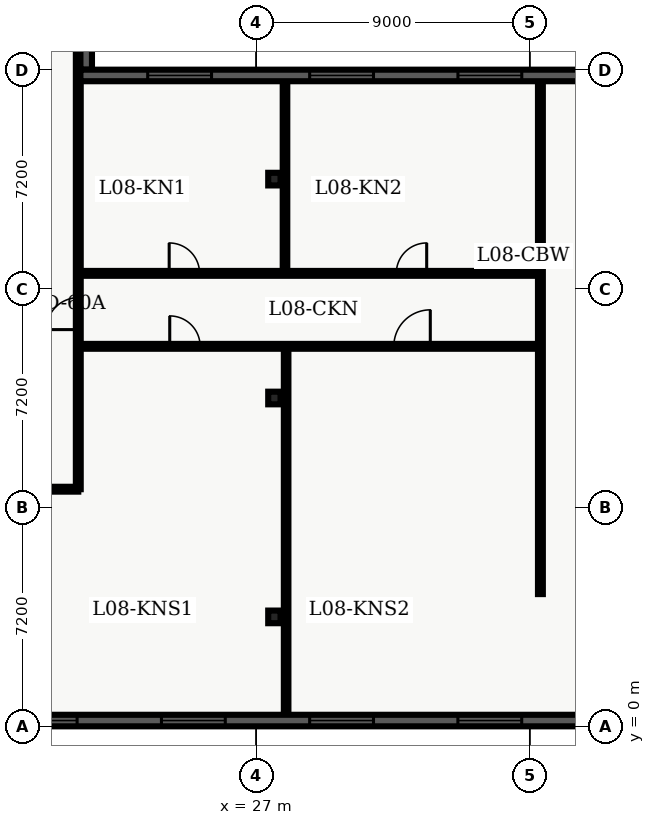
"""IFC4 building model, lengths in metres.
Left out: names, types, materials, properties, quantities, classifications, styles, units other than length and angle.
Written with IfcOpenShell. Run it as: python <this file> out.ifc"""

import sys

from ifc_helpers import new_model, entity, si_unit, converted_unit, direction, frame, origin_with_axes, origin_2d_with_axis, place, context, subcontext, project, spatial, polyline, rectangle, i_section, outline, extrude, element, fill, save


model = new_model("IFC4")
c1 = context("Model", 3, precision=1e-05, world=origin_with_axes(), true_north=direction((0.0, 1.0)))
c2 = subcontext(c1, "Body", "Model", "MODEL_VIEW")
j1 = project(units=[si_unit("LENGTHUNIT", "METRE"), converted_unit("PLANEANGLEUNIT", "DEGREE", entity("IfcPlaneAngleMeasure", 0.017), si_unit("PLANEANGLEUNIT", "RADIAN"), dimensions=[0, 0, 0, 0, 0, 0, 0])], contexts=[c1])
p1 = place(None, origin_with_axes())
s1 = spatial("IfcSite", under=j1, at=p1, CompositionType="ELEMENT")
p2 = place(p1, origin_with_axes())
s2 = spatial("IfcBuilding", under=s1, at=p2, CompositionType="ELEMENT")
p3 = place(p2, frame((0.0, 0.0, 36.6), z_axis=(0.0, 0.0, 1.0), x_axis=(1.0, 0.0, 0.0)))
s3 = spatial("IfcBuildingStorey", under=s2, at=p3, CompositionType="ELEMENT", Elevation=36.6)
for number, where, z_axis, x_axis in (
    (1, (27.6, 3.6, 0.0), (0.0, 0.0, 1.0), (1.0, 0.0, 0.0)),
    (2, (27.6, 10.8, 0.0), (0.0, 0.0, 1.0), (1.0, 0.0, 0.0)),
    (3, (27.6, 18.0, 0.0), (0.0, 0.0, 1.0), (1.0, 0.0, 0.0)),
):
    element("IfcColumn", number, at=place(p3, frame(where, z_axis=z_axis, x_axis=x_axis)), inside=s3, PredefinedType="COLUMN", context=c2, shape_type="SweptSolid", body=[
        extrude(i_section(OverallWidth=0.406, OverallDepth=0.416, WebThickness=0.03, FlangeThickness=0.048, FilletRadius=0.022, at=origin_2d_with_axis()), origin_with_axes(), (0.0, 0.0, 1.0), 3.9),
    ])
p4 = place(p3, frame((2.6, 7.8, 0.0), z_axis=(0.0, 0.0, 1.0), x_axis=(1.0, 0.0, 0.0)))
e4 = element("IfcWall", 4, at=p4, inside=s3, PredefinedType="PARTITIONING", context=c2, shape_type="SweptSolid", body=[
    extrude(outline(polyline([(0.0, -0.08), (18.55, -0.08), (18.55, 0.08), (0.0, 0.08), (0.0, -0.08)])), origin_with_axes(), (0.0, 0.0, 1.0), 2.7),
])
p5 = place(p4, frame((3.765, 0.0, 0.0), z_axis=(0.0, 0.0, 1.0), x_axis=(1.0, 0.0, 0.0)))
e5 = element("IfcOpeningElement", 5, at=p5, cuts=e4, PredefinedType="OPENING", context=c2, shape_type="SweptSolid", body=[
    extrude(rectangle(XDim=1.0, YDim=0.18, at=origin_2d_with_axis()), origin_with_axes(), (0.0, 0.0, 1.0), 2.15),
])
p6 = place(p4, frame((13.3, 0.0, 0.0), z_axis=(0.0, 0.0, 1.0), x_axis=(1.0, 0.0, 0.0)))
e6 = element("IfcOpeningElement", 6, at=p6, cuts=e4, PredefinedType="OPENING", context=c2, shape_type="SweptSolid", body=[
    extrude(rectangle(XDim=1.0, YDim=0.18, at=origin_2d_with_axis()), origin_with_axes(), (0.0, 0.0, 1.0), 2.15),
])
p7 = place(p3, frame((21.15, 7.8, 0.0), z_axis=(0.0, 0.0, 1.0), x_axis=(0.0, 1.0, 0.0)))
e7 = element("IfcWall", 7, at=p7, inside=s3, PredefinedType="PARTITIONING", context=c2, shape_type="SweptSolid", body=[
    extrude(outline(polyline([(0.0, -0.08), (32.7, -0.08), (32.7, 0.08), (0.0, 0.08), (0.0, -0.08)])), origin_with_axes(), (0.0, 0.0, 1.0), 2.7),
])
p8 = place(p7, frame((5.775, 0.0, 0.0), z_axis=(0.0, 0.0, 1.0), x_axis=(1.0, 0.0, 0.0)))
e8 = element("IfcOpeningElement", 8, at=p8, cuts=e7, PredefinedType="OPENING", context=c2, shape_type="SweptSolid", body=[
    extrude(rectangle(XDim=1.05, YDim=0.18, at=origin_2d_with_axis()), origin_with_axes(), (0.0, 0.0, 1.0), 2.15),
])
p9 = place(p3, frame((21.15, 12.5, 0.0), z_axis=(0.0, 0.0, 1.0), x_axis=(1.0, 0.0, 0.0)))
e9 = element("IfcWall", 9, at=p9, inside=s3, PredefinedType="PARTITIONING", context=c2, shape_type="SweptSolid", body=[
    extrude(outline(polyline([(0.0, -0.08), (15.2, -0.08), (15.2, 0.08), (0.0, 0.08), (0.0, -0.08)])), origin_with_axes(), (0.0, 0.0, 1.0), 2.7),
])
p10 = place(p9, frame((3.508, 0.0, 0.0), z_axis=(0.0, 0.0, 1.0), x_axis=(1.0, 0.0, 0.0)))
e10 = element("IfcOpeningElement", 10, at=p10, cuts=e9, PredefinedType="OPENING", context=c2, shape_type="SweptSolid", body=[
    extrude(rectangle(XDim=1.0, YDim=0.18, at=origin_2d_with_axis()), origin_with_axes(), (0.0, 0.0, 1.0), 2.15),
])
p11 = place(p9, frame((10.978, 0.0, 0.0), z_axis=(0.0, 0.0, 1.0), x_axis=(1.0, 0.0, 0.0)))
e11 = element("IfcOpeningElement", 11, at=p11, cuts=e9, PredefinedType="OPENING", context=c2, shape_type="SweptSolid", body=[
    extrude(rectangle(XDim=1.2, YDim=0.18, at=origin_2d_with_axis()), origin_with_axes(), (0.0, 0.0, 1.0), 2.2),
])
p12 = place(p3, frame((21.15, 14.9, 0.0), z_axis=(0.0, 0.0, 1.0), x_axis=(1.0, 0.0, 0.0)))
e12 = element("IfcWall", 12, at=p12, inside=s3, PredefinedType="PARTITIONING", context=c2, shape_type="SweptSolid", body=[
    extrude(outline(polyline([(0.0, -0.08), (15.2, -0.08), (15.2, 0.08), (0.0, 0.08), (0.0, -0.08)])), origin_with_axes(), (0.0, 0.0, 1.0), 2.7),
])
p13 = place(p12, frame((3.49, 0.0, 0.0), z_axis=(0.0, 0.0, 1.0), x_axis=(1.0, 0.0, 0.0)))
e13 = element("IfcOpeningElement", 13, at=p13, cuts=e12, PredefinedType="OPENING", context=c2, shape_type="SweptSolid", body=[
    extrude(rectangle(XDim=1.0, YDim=0.18, at=origin_2d_with_axis()), origin_with_axes(), (0.0, 0.0, 1.0), 2.15),
])
p14 = place(p12, frame((10.96, 0.0, 0.0), z_axis=(0.0, 0.0, 1.0), x_axis=(1.0, 0.0, 0.0)))
e14 = element("IfcOpeningElement", 14, at=p14, cuts=e12, PredefinedType="OPENING", context=c2, shape_type="SweptSolid", body=[
    extrude(rectangle(XDim=1.0, YDim=0.18, at=origin_2d_with_axis()), origin_with_axes(), (0.0, 0.0, 1.0), 2.15),
])
p15 = place(p3, frame((36.35, 4.35, 0.0), z_axis=(0.0, 0.0, 1.0), x_axis=(0.0, 1.0, 0.0)))
e15 = element("IfcWall", 15, at=p15, inside=s3, PredefinedType="PARTITIONING", context=c2, shape_type="SweptSolid", body=[
    extrude(outline(polyline([(0.0, -0.08), (16.95, -0.08), (16.95, 0.08), (0.0, 0.08), (0.0, -0.08)])), origin_with_axes(), (0.0, 0.0, 1.0), 2.7),
])
p16 = place(p3, frame((27.986, 0.36, 0.0), z_axis=(0.0, 0.0, 1.0), x_axis=(0.0, 1.0, 0.0)))
e16 = element("IfcWall", 16, at=p16, inside=s3, PredefinedType="PARTITIONING", context=c2, shape_type="SweptSolid", body=[
    extrude(outline(polyline([(0.0, -0.075), (12.02, -0.075), (12.02, 0.075), (0.0, 0.075), (0.0, -0.075)])), origin_with_axes(), (0.0, 0.0, 1.0), 2.7),
])
p17 = place(p3, frame((27.949, 15.02, 0.0), z_axis=(0.0, 0.0, 1.0), x_axis=(0.0, 1.0, 0.0)))
e17 = element("IfcWall", 17, at=p17, inside=s3, PredefinedType="PARTITIONING", context=c2, shape_type="SweptSolid", body=[
    extrude(outline(polyline([(0.0, -0.075), (6.205, -0.075), (6.205, 0.075), (0.0, 0.075), (0.0, -0.075)])), origin_with_axes(), (0.0, 0.0, 1.0), 2.7),
])
p18 = place(p3, frame((57.22, 0.19, 0.0), z_axis=(0.0, 0.0, 1.0), x_axis=(-1.0, 0.0, 0.0)))
e18 = element("IfcWall", 18, at=p18, inside=s3, PredefinedType="SOLIDWALL", context=c2, shape_type="SweptSolid", body=[
    extrude(outline(polyline([(0.0, -0.19), (54.82, -0.19), (54.82, 0.19), (0.0, 0.19), (0.0, -0.19)])), origin_with_axes(), (0.0, 0.0, 1.0), 3.66),
])
p19 = place(p18, frame((3.037, 0.0, 0.45), z_axis=(0.0, 0.0, 1.0), x_axis=(1.0, 0.0, 0.0)))
e19 = element("IfcOpeningElement", 19, at=p19, cuts=e18, PredefinedType="OPENING", context=c2, shape_type="SweptSolid", body=[
    extrude(rectangle(XDim=2.1, YDim=0.4, at=origin_2d_with_axis()), origin_with_axes(), (0.0, 0.0, 1.0), 2.2),
])
p20 = place(p18, frame((7.912, 0.0, 0.45), z_axis=(0.0, 0.0, 1.0), x_axis=(1.0, 0.0, 0.0)))
e20 = element("IfcOpeningElement", 20, at=p20, cuts=e18, PredefinedType="OPENING", context=c2, shape_type="SweptSolid", body=[
    extrude(rectangle(XDim=2.1, YDim=0.4, at=origin_2d_with_axis()), origin_with_axes(), (0.0, 0.0, 1.0), 2.2),
])
p21 = place(p18, frame((12.786, 0.0, 0.45), z_axis=(0.0, 0.0, 1.0), x_axis=(1.0, 0.0, 0.0)))
e21 = element("IfcOpeningElement", 21, at=p21, cuts=e18, PredefinedType="OPENING", context=c2, shape_type="SweptSolid", body=[
    extrude(rectangle(XDim=2.1, YDim=0.4, at=origin_2d_with_axis()), origin_with_axes(), (0.0, 0.0, 1.0), 2.2),
])
p22 = place(p18, frame((17.661, 0.0, 0.45), z_axis=(0.0, 0.0, 1.0), x_axis=(1.0, 0.0, 0.0)))
e22 = element("IfcOpeningElement", 22, at=p22, cuts=e18, PredefinedType="OPENING", context=c2, shape_type="SweptSolid", body=[
    extrude(rectangle(XDim=2.1, YDim=0.4, at=origin_2d_with_axis()), origin_with_axes(), (0.0, 0.0, 1.0), 2.2),
])
p23 = place(p18, frame((22.535, 0.0, 0.45), z_axis=(0.0, 0.0, 1.0), x_axis=(1.0, 0.0, 0.0)))
e23 = element("IfcOpeningElement", 23, at=p23, cuts=e18, PredefinedType="OPENING", context=c2, shape_type="SweptSolid", body=[
    extrude(rectangle(XDim=2.1, YDim=0.4, at=origin_2d_with_axis()), origin_with_axes(), (0.0, 0.0, 1.0), 2.2),
])
p24 = place(p18, frame((27.41, 0.0, 0.45), z_axis=(0.0, 0.0, 1.0), x_axis=(1.0, 0.0, 0.0)))
e24 = element("IfcOpeningElement", 24, at=p24, cuts=e18, PredefinedType="OPENING", context=c2, shape_type="SweptSolid", body=[
    extrude(rectangle(XDim=2.1, YDim=0.4, at=origin_2d_with_axis()), origin_with_axes(), (0.0, 0.0, 1.0), 2.2),
])
p25 = place(p18, frame((32.285, 0.0, 0.45), z_axis=(0.0, 0.0, 1.0), x_axis=(1.0, 0.0, 0.0)))
e25 = element("IfcOpeningElement", 25, at=p25, cuts=e18, PredefinedType="OPENING", context=c2, shape_type="SweptSolid", body=[
    extrude(rectangle(XDim=2.1, YDim=0.4, at=origin_2d_with_axis()), origin_with_axes(), (0.0, 0.0, 1.0), 2.2),
])
p26 = place(p18, frame((37.159, 0.0, 0.45), z_axis=(0.0, 0.0, 1.0), x_axis=(1.0, 0.0, 0.0)))
e26 = element("IfcOpeningElement", 26, at=p26, cuts=e18, PredefinedType="OPENING", context=c2, shape_type="SweptSolid", body=[
    extrude(rectangle(XDim=2.1, YDim=0.4, at=origin_2d_with_axis()), origin_with_axes(), (0.0, 0.0, 1.0), 2.2),
])
p27 = place(p18, frame((42.034, 0.0, 0.45), z_axis=(0.0, 0.0, 1.0), x_axis=(1.0, 0.0, 0.0)))
e27 = element("IfcOpeningElement", 27, at=p27, cuts=e18, PredefinedType="OPENING", context=c2, shape_type="SweptSolid", body=[
    extrude(rectangle(XDim=2.1, YDim=0.4, at=origin_2d_with_axis()), origin_with_axes(), (0.0, 0.0, 1.0), 2.2),
])
p28 = place(p18, frame((51.783, 0.0, 0.45), z_axis=(0.0, 0.0, 1.0), x_axis=(1.0, 0.0, 0.0)))
e28 = element("IfcOpeningElement", 28, at=p28, cuts=e18, PredefinedType="OPENING", context=c2, shape_type="SweptSolid", body=[
    extrude(rectangle(XDim=2.1, YDim=0.4, at=origin_2d_with_axis()), origin_with_axes(), (0.0, 0.0, 1.0), 2.2),
])
p29 = place(p3, frame((21.41, 45.82, 0.0), z_axis=(0.0, 0.0, 1.0), x_axis=(0.0, -1.0, 0.0)))
e29 = element("IfcWall", 29, at=p29, inside=s3, PredefinedType="SOLIDWALL", context=c2, shape_type="SweptSolid", body=[
    extrude(outline(polyline([(0.0, -0.19), (24.22, -0.19), (24.22, 0.19), (0.0, 0.19), (0.0, -0.19)])), origin_with_axes(), (0.0, 0.0, 1.0), 3.66),
])
p30 = place(p29, frame((2.902, 0.0, 0.45), z_axis=(0.0, 0.0, 1.0), x_axis=(1.0, 0.0, 0.0)))
e30 = element("IfcOpeningElement", 30, at=p30, cuts=e29, PredefinedType="OPENING", context=c2, shape_type="SweptSolid", body=[
    extrude(rectangle(XDim=2.1, YDim=0.4, at=origin_2d_with_axis()), origin_with_axes(), (0.0, 0.0, 1.0), 2.2),
])
p31 = place(p3, frame((21.22, 21.41, 0.0), z_axis=(0.0, 0.0, 1.0), x_axis=(1.0, 0.0, 0.0)))
e31 = element("IfcWall", 31, at=p31, inside=s3, PredefinedType="SOLIDWALL", context=c2, shape_type="SweptSolid", body=[
    extrude(outline(polyline([(0.0, -0.19), (17.18, -0.19), (17.18, 0.19), (0.0, 0.19), (0.0, -0.19)])), origin_with_axes(), (0.0, 0.0, 1.0), 3.66),
])
p32 = place(p31, frame((3.263, 0.0, 0.45), z_axis=(0.0, 0.0, 1.0), x_axis=(1.0, 0.0, 0.0)))
e32 = element("IfcOpeningElement", 32, at=p32, cuts=e31, PredefinedType="OPENING", context=c2, shape_type="SweptSolid", body=[
    extrude(rectangle(XDim=2.1, YDim=0.4, at=origin_2d_with_axis()), origin_with_axes(), (0.0, 0.0, 1.0), 2.2),
])
p33 = place(p31, frame((8.59, 0.0, 0.45), z_axis=(0.0, 0.0, 1.0), x_axis=(1.0, 0.0, 0.0)))
e33 = element("IfcOpeningElement", 33, at=p33, cuts=e31, PredefinedType="OPENING", context=c2, shape_type="SweptSolid", body=[
    extrude(rectangle(XDim=2.1, YDim=0.4, at=origin_2d_with_axis()), origin_with_axes(), (0.0, 0.0, 1.0), 2.2),
])
p34 = place(p31, frame((13.467, 0.0, 0.45), z_axis=(0.0, 0.0, 1.0), x_axis=(1.0, 0.0, 0.0)))
e34 = element("IfcOpeningElement", 34, at=p34, cuts=e31, PredefinedType="OPENING", context=c2, shape_type="SweptSolid", body=[
    extrude(rectangle(XDim=2.1, YDim=0.4, at=origin_2d_with_axis()), origin_with_axes(), (0.0, 0.0, 1.0), 2.2),
])
p35 = place(p7, frame((5.775, 0.0, 0.0), z_axis=(0.0, 0.0, 1.0), x_axis=(1.0, 0.0, 0.0)))
e35 = element("IfcDoor", 35, at=p35, inside=s3, OperationType="SINGLE_SWING_LEFT", PredefinedType="DOOR", context=c2, shape_type="SweptSolid", body=[
    extrude(rectangle(XDim=1.05, YDim=0.09, at=origin_2d_with_axis()), origin_with_axes(), (0.0, 0.0, 1.0), 2.15),
])
fill(e8, e35)
p36 = place(p9, frame((3.508, 0.0, 0.0), z_axis=(0.0, 0.0, 1.0), x_axis=(1.0, 0.0, 0.0)))
e36 = element("IfcDoor", 36, at=p36, inside=s3, OperationType="SINGLE_SWING_LEFT", PredefinedType="DOOR", context=c2, shape_type="SweptSolid", body=[
    extrude(rectangle(XDim=1.0, YDim=0.09, at=origin_2d_with_axis()), origin_with_axes(), (0.0, 0.0, 1.0), 2.15),
])
fill(e10, e36)
p37 = place(p9, frame((10.978, 0.0, 0.0), z_axis=(0.0, 0.0, 1.0), x_axis=(1.0, 0.0, 0.0)))
e37 = element("IfcDoor", 37, at=p37, inside=s3, OperationType="SINGLE_SWING_RIGHT", PredefinedType="DOOR", context=c2, shape_type="SweptSolid", body=[
    extrude(rectangle(XDim=1.2, YDim=0.09, at=origin_2d_with_axis()), origin_with_axes(), (0.0, 0.0, 1.0), 2.2),
])
fill(e11, e37)
p38 = place(p12, frame((3.49, 0.0, 0.0), z_axis=(0.0, 0.0, 1.0), x_axis=(1.0, 0.0, 0.0)))
e38 = element("IfcDoor", 38, at=p38, inside=s3, OperationType="SINGLE_SWING_LEFT", PredefinedType="DOOR", context=c2, shape_type="SweptSolid", body=[
    extrude(rectangle(XDim=1.0, YDim=0.09, at=origin_2d_with_axis()), origin_with_axes(), (0.0, 0.0, 1.0), 2.15),
])
fill(e13, e38)
p39 = place(p12, frame((10.96, 0.0, 0.0), z_axis=(0.0, 0.0, 1.0), x_axis=(1.0, 0.0, 0.0)))
e39 = element("IfcDoor", 39, at=p39, inside=s3, OperationType="SINGLE_SWING_RIGHT", PredefinedType="DOOR", context=c2, shape_type="SweptSolid", body=[
    extrude(rectangle(XDim=1.0, YDim=0.09, at=origin_2d_with_axis()), origin_with_axes(), (0.0, 0.0, 1.0), 2.15),
])
fill(e14, e39)
p40 = place(p18, frame((22.535, 0.0, 0.45), z_axis=(0.0, 0.0, 1.0), x_axis=(1.0, 0.0, 0.0)))
e40 = element("IfcWindow", 40, at=p40, inside=s3, PredefinedType="WINDOW", context=c2, shape_type="SweptSolid", body=[
    extrude(rectangle(XDim=2.1, YDim=0.09, at=origin_2d_with_axis()), origin_with_axes(), (0.0, 0.0, 1.0), 2.2),
])
fill(e23, e40)
p41 = place(p18, frame((27.41, 0.0, 0.45), z_axis=(0.0, 0.0, 1.0), x_axis=(1.0, 0.0, 0.0)))
e41 = element("IfcWindow", 41, at=p41, inside=s3, PredefinedType="WINDOW", context=c2, shape_type="SweptSolid", body=[
    extrude(rectangle(XDim=2.1, YDim=0.09, at=origin_2d_with_axis()), origin_with_axes(), (0.0, 0.0, 1.0), 2.2),
])
fill(e24, e41)
p42 = place(p18, frame((32.285, 0.0, 0.45), z_axis=(0.0, 0.0, 1.0), x_axis=(1.0, 0.0, 0.0)))
e42 = element("IfcWindow", 42, at=p42, inside=s3, PredefinedType="WINDOW", context=c2, shape_type="SweptSolid", body=[
    extrude(rectangle(XDim=2.1, YDim=0.09, at=origin_2d_with_axis()), origin_with_axes(), (0.0, 0.0, 1.0), 2.2),
])
fill(e25, e42)
p43 = place(p18, frame((37.159, 0.0, 0.45), z_axis=(0.0, 0.0, 1.0), x_axis=(1.0, 0.0, 0.0)))
e43 = element("IfcWindow", 43, at=p43, inside=s3, PredefinedType="WINDOW", context=c2, shape_type="SweptSolid", body=[
    extrude(rectangle(XDim=2.1, YDim=0.09, at=origin_2d_with_axis()), origin_with_axes(), (0.0, 0.0, 1.0), 2.2),
])
fill(e26, e43)
p44 = place(p31, frame((3.263, 0.0, 0.45), z_axis=(0.0, 0.0, 1.0), x_axis=(1.0, 0.0, 0.0)))
e44 = element("IfcWindow", 44, at=p44, inside=s3, PredefinedType="WINDOW", context=c2, shape_type="SweptSolid", body=[
    extrude(rectangle(XDim=2.1, YDim=0.09, at=origin_2d_with_axis()), origin_with_axes(), (0.0, 0.0, 1.0), 2.2),
])
fill(e32, e44)
p45 = place(p31, frame((8.59, 0.0, 0.45), z_axis=(0.0, 0.0, 1.0), x_axis=(1.0, 0.0, 0.0)))
e45 = element("IfcWindow", 45, at=p45, inside=s3, PredefinedType="WINDOW", context=c2, shape_type="SweptSolid", body=[
    extrude(rectangle(XDim=2.1, YDim=0.09, at=origin_2d_with_axis()), origin_with_axes(), (0.0, 0.0, 1.0), 2.2),
])
fill(e33, e45)
p46 = place(p31, frame((13.467, 0.0, 0.45), z_axis=(0.0, 0.0, 1.0), x_axis=(1.0, 0.0, 0.0)))
e46 = element("IfcWindow", 46, at=p46, inside=s3, PredefinedType="WINDOW", context=c2, shape_type="SweptSolid", body=[
    extrude(rectangle(XDim=2.1, YDim=0.09, at=origin_2d_with_axis()), origin_with_axes(), (0.0, 0.0, 1.0), 2.2),
])
fill(e34, e46)
save(model, sys.argv[1])
